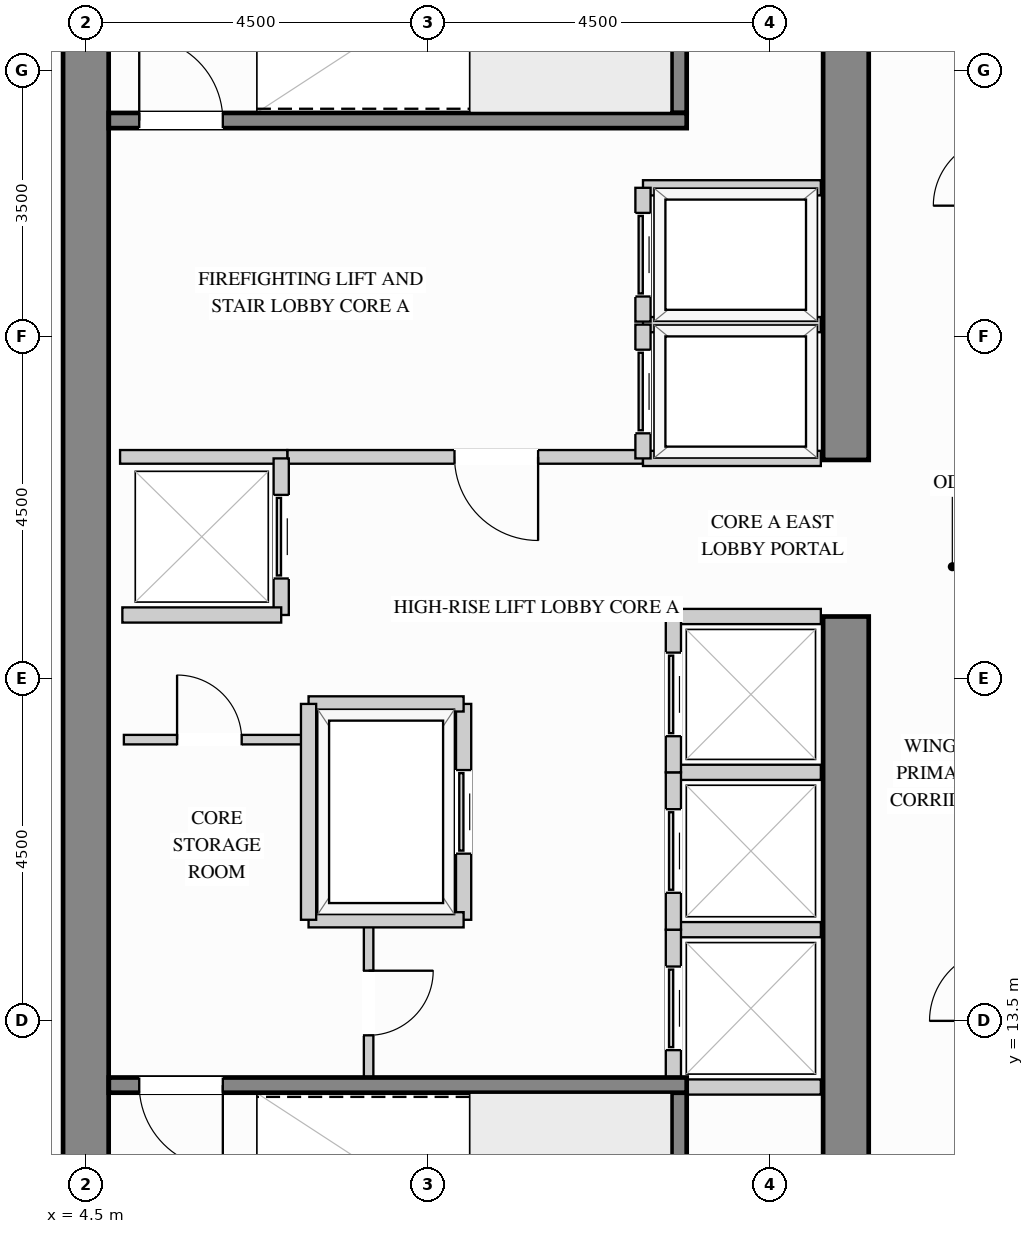
"""IFC4 building model, lengths in metres.
Left out: names, types, materials, properties, quantities, classifications, styles, units other than length and angle.
Written with IfcOpenShell. Run it as: python <this file> out.ifc"""

import sys

from ifc_helpers import new_model, si_unit, direction, frame, frame_2d, origin, place, context, subcontext, project, spatial, rectangle, extrude, source, transform, mapped, element, fill, save


model = new_model("IFC4")
c1 = context("Model", 3, precision=1e-05, world=origin(), true_north=direction((0.0, 1.0)))
c2 = subcontext(c1, "Body", "Model", "MODEL_VIEW")
j1 = project(units=[si_unit("LENGTHUNIT", "METRE"), si_unit("PLANEANGLEUNIT", "RADIAN")], contexts=[c1])
p1 = place(None, origin())
s1 = spatial("IfcSite", under=j1, at=p1, CompositionType="ELEMENT")
p2 = place(p1, origin())
s2 = spatial("IfcBuilding", under=s1, at=p2, CompositionType="ELEMENT")
p3 = place(p2, frame((0.0, 0.0, 204.3)))
s3 = spatial("IfcBuildingStorey", under=s2, at=p3, CompositionType="ELEMENT", Elevation=204.3)
m1 = source(origin(), c2, "Body", "SweptSolid", [
    extrude(rectangle(XDim=10.02, YDim=0.6, at=frame_2d((5.01, 0.0))), origin(), (0.0, 0.0, 1.0), 3.32),
])
p4 = place(p3, frame((14.5, 8.8, 0.0), z_axis=(0.0, 0.0, 1.0), x_axis=(0.0, 1.0, 0.0)))
e1 = element("IfcWall", 1, at=p4, inside=s3, PredefinedType="SHEAR", context=c2, shape_type="MappedRepresentation", body=[
    mapped(m1, transform((0.0, 0.0, 0.0), x_axis=(1.0, 0.0, 0.0), y_axis=(0.0, 1.0, 0.0), z_axis=(0.0, 0.0, 1.0))),
])
m2 = source(origin(), c2, "Body", "SweptSolid", [
    extrude(rectangle(XDim=8.32, YDim=0.6, at=frame_2d((4.16, 0.0))), origin(), (0.0, 0.0, 1.0), 3.32),
])
p5 = place(p3, frame((14.5, 20.88, 0.0), z_axis=(0.0, 0.0, 1.0), x_axis=(0.0, 1.0, 0.0)))
e2 = element("IfcWall", 2, at=p5, inside=s3, PredefinedType="SHEAR", context=c2, shape_type="MappedRepresentation", body=[
    mapped(m2, transform((0.0, 0.0, 0.0), x_axis=(1.0, 0.0, 0.0), y_axis=(0.0, 1.0, 0.0), z_axis=(0.0, 0.0, 1.0))),
])
m3 = source(origin(), c2, "Body", "SweptSolid", [
    extrude(rectangle(XDim=20.4, YDim=0.6, at=frame_2d((10.2, 0.0))), origin(), (0.0, 0.0, 1.0), 3.32),
])
p6 = place(p3, frame((4.5, 8.8, 0.0), z_axis=(0.0, 0.0, 1.0), x_axis=(0.0, 1.0, 0.0)))
e3 = element("IfcWall", 3, at=p6, inside=s3, PredefinedType="SHEAR", context=c2, shape_type="MappedRepresentation", body=[
    mapped(m3, transform((0.0, 0.0, 0.0), x_axis=(1.0, 0.0, 0.0), y_axis=(0.0, 1.0, 0.0), z_axis=(0.0, 0.0, 1.0))),
])
p7 = place(p3, frame((7.15, 20.92, 0.0), z_axis=(0.0, 0.0, 1.0), x_axis=(1.0, 0.0, 0.0)))
e4 = element("IfcWall", 4, at=p7, inside=s3, PredefinedType="PARTITIONING", context=c2, shape_type="SweptSolid", body=[
    extrude(rectangle(XDim=4.68, YDim=0.18, at=frame_2d((2.34, 0.0))), origin(), (0.0, 0.0, 1.0), 3.305),
])
p8 = place(p7, frame((2.2, 0.0, 0.0)))
e5 = element("IfcOpeningElement", 5, at=p8, cuts=e4, PredefinedType="OPENING", context=c2, shape_type="SweptSolid", body=[
    extrude(rectangle(XDim=1.1, YDim=2.15, at=frame_2d((0.55, 1.075))), frame((0.0, 0.1, 0.0), z_axis=(0.0, -1.0, 0.0), x_axis=(1.0, 0.0, 0.0)), (0.0, 0.0, 1.0), 0.2),
])
m4 = source(origin(), c2, "Body", "SweptSolid", [
    extrude(rectangle(XDim=2.2, YDim=0.18, at=frame_2d((1.1, 0.0))), origin(), (0.0, 0.0, 1.0), 3.305),
])
p9 = place(p3, frame((4.95, 20.92, 0.0), z_axis=(0.0, 0.0, 1.0), x_axis=(1.0, 0.0, 0.0)))
e6 = element("IfcWall", 6, at=p9, inside=s3, PredefinedType="PARTITIONING", context=c2, shape_type="MappedRepresentation", body=[
    mapped(m4, transform((0.0, 0.0, 0.0), x_axis=(1.0, 0.0, 0.0), y_axis=(0.0, 1.0, 0.0), z_axis=(0.0, 0.0, 1.0))),
])
p10 = place(p3, frame((8.22, 12.75, 0.0), z_axis=(0.0, 0.0, 1.0), x_axis=(0.0, 1.0, 0.0)))
e7 = element("IfcWall", 7, at=p10, inside=s3, PredefinedType="PARTITIONING", context=c2, shape_type="SweptSolid", body=[
    extrude(rectangle(XDim=2.07, YDim=0.125, at=frame_2d((1.035, 0.0))), origin(), (0.0, 0.0, 1.0), 3.305),
])
p11 = place(p10, frame((0.56, 0.0, 0.0)))
e8 = element("IfcOpeningElement", 8, at=p11, cuts=e7, PredefinedType="OPENING", context=c2, shape_type="SweptSolid", body=[
    extrude(rectangle(XDim=0.85, YDim=2.1, at=frame_2d((0.425, 1.05))), frame((0.0, 0.073, 0.0), z_axis=(0.0, -1.0, 0.0), x_axis=(1.0, 0.0, 0.0)), (0.0, 0.0, 1.0), 0.145),
])
p12 = place(p3, frame((5.0, 17.2, 0.0), z_axis=(0.0, 0.0, 1.0), x_axis=(1.0, 0.0, 0.0)))
e9 = element("IfcWall", 9, at=p12, inside=s3, PredefinedType="PARTITIONING", context=c2, shape_type="SweptSolid", body=[
    extrude(rectangle(XDim=2.4, YDim=0.125, at=frame_2d((1.2, 0.0))), origin(), (0.0, 0.0, 1.0), 3.305),
])
p13 = place(p12, frame((0.7, 0.0, 0.0)))
e10 = element("IfcOpeningElement", 10, at=p13, cuts=e9, PredefinedType="OPENING", context=c2, shape_type="SweptSolid", body=[
    extrude(rectangle(XDim=0.85, YDim=2.1, at=frame_2d((0.425, 1.05))), frame((0.0, 0.073, 0.0), z_axis=(0.0, -1.0, 0.0), x_axis=(1.0, 0.0, 0.0)), (0.0, 0.0, 1.0), 0.145),
])
m5 = source(origin(), c2, "Body", "SweptSolid", [
    extrude(rectangle(XDim=2.34, YDim=0.2, at=frame_2d((1.17, 0.0))), origin(), (0.0, 0.0, 1.0), 3.305),
])
for number, where, z_axis, x_axis in (
    (11, (11.83, 22.66, 0.0), (0.0, 0.0, 1.0), (1.0, 0.0, 0.0)),
    (12, (11.83, 20.9, 0.0), (0.0, 0.0, 1.0), (1.0, 0.0, 0.0)),
):
    element("IfcWall", number, at=place(p3, frame(where, z_axis=z_axis, x_axis=x_axis)), inside=s3, PredefinedType="PARTITIONING", context=c2, shape_type="MappedRepresentation", body=[
        mapped(m5, transform((0.0, 0.0, 0.0), x_axis=(1.0, 0.0, 0.0), y_axis=(0.0, 1.0, 0.0), z_axis=(0.0, 0.0, 1.0))),
    ])
p14 = place(p3, frame((11.83, 20.9, 0.0), z_axis=(0.0, 0.0, 1.0), x_axis=(0.0, 1.0, 0.0)))
e13 = element("IfcWall", 13, at=p14, inside=s3, PredefinedType="PARTITIONING", context=c2, shape_type="SweptSolid", body=[
    extrude(rectangle(XDim=1.76, YDim=0.2, at=frame_2d((0.88, 0.0))), origin(), (0.0, 0.0, 1.0), 3.305),
])
p15 = place(p14, frame((0.33, 0.0, 0.0)))
e14 = element("IfcOpeningElement", 14, at=p15, cuts=e13, PredefinedType="OPENING", context=c2, shape_type="SweptSolid", body=[
    extrude(rectangle(XDim=1.1, YDim=2.2, at=frame_2d((0.55, 1.1))), frame((0.0, 0.11, 0.0), z_axis=(0.0, -1.0, 0.0), x_axis=(1.0, 0.0, 0.0)), (0.0, 0.0, 1.0), 0.22),
])
p16 = place(p3, frame((11.83, 24.46, 0.0), z_axis=(0.0, 0.0, 1.0), x_axis=(1.0, 0.0, 0.0)))
e15 = element("IfcWall", 15, at=p16, inside=s3, PredefinedType="PARTITIONING", context=c2, shape_type="MappedRepresentation", body=[
    mapped(m5, transform((0.0, 0.0, 0.0), x_axis=(1.0, 0.0, 0.0), y_axis=(0.0, 1.0, 0.0), z_axis=(0.0, 0.0, 1.0))),
])
p17 = place(p3, frame((11.83, 22.7, 0.0), z_axis=(0.0, 0.0, 1.0), x_axis=(0.0, 1.0, 0.0)))
e16 = element("IfcWall", 16, at=p17, inside=s3, PredefinedType="PARTITIONING", context=c2, shape_type="SweptSolid", body=[
    extrude(rectangle(XDim=1.76, YDim=0.2, at=frame_2d((0.88, 0.0))), origin(), (0.0, 0.0, 1.0), 3.305),
])
p18 = place(p17, frame((0.33, 0.0, 0.0)))
e17 = element("IfcOpeningElement", 17, at=p18, cuts=e16, PredefinedType="OPENING", context=c2, shape_type="SweptSolid", body=[
    extrude(rectangle(XDim=1.1, YDim=2.2, at=frame_2d((0.55, 1.1))), frame((0.0, 0.11, 0.0), z_axis=(0.0, -1.0, 0.0), x_axis=(1.0, 0.0, 0.0)), (0.0, 0.0, 1.0), 0.22),
])
m6 = source(origin(), c2, "Body", "SweptSolid", [
    extrude(rectangle(XDim=1.94, YDim=0.2, at=frame_2d((0.97, 0.0))), origin(), (0.0, 0.0, 1.0), 3.305),
])
for number, where, z_axis, x_axis in (
    (18, (12.23, 14.7, 0.0), (0.0, 0.0, 1.0), (1.0, 0.0, 0.0)),
    (19, (12.23, 12.63, 0.0), (0.0, 0.0, 1.0), (1.0, 0.0, 0.0)),
):
    element("IfcWall", number, at=place(p3, frame(where, z_axis=z_axis, x_axis=x_axis)), inside=s3, PredefinedType="PARTITIONING", context=c2, shape_type="MappedRepresentation", body=[
        mapped(m6, transform((0.0, 0.0, 0.0), x_axis=(1.0, 0.0, 0.0), y_axis=(0.0, 1.0, 0.0), z_axis=(0.0, 0.0, 1.0))),
    ])
p19 = place(p3, frame((12.23, 12.63, 0.0), z_axis=(0.0, 0.0, 1.0), x_axis=(0.0, 1.0, 0.0)))
e20 = element("IfcWall", 20, at=p19, inside=s3, PredefinedType="PARTITIONING", context=c2, shape_type="SweptSolid", body=[
    extrude(rectangle(XDim=2.07, YDim=0.2, at=frame_2d((1.035, 0.0))), origin(), (0.0, 0.0, 1.0), 3.305),
])
p20 = place(p19, frame((0.485, 0.0, 0.0)))
e21 = element("IfcOpeningElement", 21, at=p20, cuts=e20, PredefinedType="OPENING", context=c2, shape_type="SweptSolid", body=[
    extrude(rectangle(XDim=1.1, YDim=2.2, at=frame_2d((0.55, 1.1))), frame((0.0, 0.11, 0.0), z_axis=(0.0, -1.0, 0.0), x_axis=(1.0, 0.0, 0.0)), (0.0, 0.0, 1.0), 0.22),
])
p21 = place(p3, frame((12.23, 16.77, 0.0), z_axis=(0.0, 0.0, 1.0), x_axis=(1.0, 0.0, 0.0)))
e22 = element("IfcWall", 22, at=p21, inside=s3, PredefinedType="PARTITIONING", context=c2, shape_type="MappedRepresentation", body=[
    mapped(m6, transform((0.0, 0.0, 0.0), x_axis=(1.0, 0.0, 0.0), y_axis=(0.0, 1.0, 0.0), z_axis=(0.0, 0.0, 1.0))),
])
p22 = place(p3, frame((12.23, 14.7, 0.0), z_axis=(0.0, 0.0, 1.0), x_axis=(0.0, 1.0, 0.0)))
e23 = element("IfcWall", 23, at=p22, inside=s3, PredefinedType="PARTITIONING", context=c2, shape_type="SweptSolid", body=[
    extrude(rectangle(XDim=2.07, YDim=0.2, at=frame_2d((1.035, 0.0))), origin(), (0.0, 0.0, 1.0), 3.305),
])
p23 = place(p22, frame((0.485, 0.0, 0.0)))
e24 = element("IfcOpeningElement", 24, at=p23, cuts=e23, PredefinedType="OPENING", context=c2, shape_type="SweptSolid", body=[
    extrude(rectangle(XDim=1.1, YDim=2.2, at=frame_2d((0.55, 1.1))), frame((0.0, 0.11, 0.0), z_axis=(0.0, -1.0, 0.0), x_axis=(1.0, 0.0, 0.0)), (0.0, 0.0, 1.0), 0.22),
])
p24 = place(p3, frame((12.23, 18.82, 0.0), z_axis=(0.0, 0.0, 1.0), x_axis=(1.0, 0.0, 0.0)))
e25 = element("IfcWall", 25, at=p24, inside=s3, PredefinedType="PARTITIONING", context=c2, shape_type="MappedRepresentation", body=[
    mapped(m6, transform((0.0, 0.0, 0.0), x_axis=(1.0, 0.0, 0.0), y_axis=(0.0, 1.0, 0.0), z_axis=(0.0, 0.0, 1.0))),
])
p25 = place(p3, frame((12.23, 16.77, 0.0), z_axis=(0.0, 0.0, 1.0), x_axis=(0.0, 1.0, 0.0)))
e26 = element("IfcWall", 26, at=p25, inside=s3, PredefinedType="PARTITIONING", context=c2, shape_type="SweptSolid", body=[
    extrude(rectangle(XDim=2.05, YDim=0.2, at=frame_2d((1.025, 0.0))), origin(), (0.0, 0.0, 1.0), 3.305),
])
p26 = place(p25, frame((0.475, 0.0, 0.0)))
e27 = element("IfcOpeningElement", 27, at=p26, cuts=e26, PredefinedType="OPENING", context=c2, shape_type="SweptSolid", body=[
    extrude(rectangle(XDim=1.1, YDim=2.2, at=frame_2d((0.55, 1.1))), frame((0.0, 0.11, 0.0), z_axis=(0.0, -1.0, 0.0), x_axis=(1.0, 0.0, 0.0)), (0.0, 0.0, 1.0), 0.22),
])
p27 = place(p3, frame((7.07, 18.84, 0.0), z_axis=(0.0, 0.0, 1.0), x_axis=(0.0, 1.0, 0.0)))
e28 = element("IfcWall", 28, at=p27, inside=s3, PredefinedType="PARTITIONING", context=c2, shape_type="SweptSolid", body=[
    extrude(rectangle(XDim=2.06, YDim=0.2, at=frame_2d((1.03, 0.0))), origin(), (0.0, 0.0, 1.0), 3.305),
])
p28 = place(p27, frame((0.48, 0.0, 0.0)))
e29 = element("IfcOpeningElement", 29, at=p28, cuts=e28, PredefinedType="OPENING", context=c2, shape_type="SweptSolid", body=[
    extrude(rectangle(XDim=1.1, YDim=2.2, at=frame_2d((0.55, 1.1))), frame((0.0, 0.11, 0.0), z_axis=(0.0, -1.0, 0.0), x_axis=(1.0, 0.0, 0.0)), (0.0, 0.0, 1.0), 0.22),
])
m7 = source(origin(), c2, "Body", "SweptSolid", [
    extrude(rectangle(XDim=2.09, YDim=0.2, at=frame_2d((1.045, 0.0))), origin(), (0.0, 0.0, 1.0), 3.305),
])
p29 = place(p3, frame((4.98, 18.84, 0.0), z_axis=(0.0, 0.0, 1.0), x_axis=(1.0, 0.0, 0.0)))
e30 = element("IfcWall", 30, at=p29, inside=s3, PredefinedType="PARTITIONING", context=c2, shape_type="MappedRepresentation", body=[
    mapped(m7, transform((0.0, 0.0, 0.0), x_axis=(1.0, 0.0, 0.0), y_axis=(0.0, 1.0, 0.0), z_axis=(0.0, 0.0, 1.0))),
])
p30 = place(p3, frame((9.47, 14.83, 0.0), z_axis=(0.0, 0.0, 1.0), x_axis=(0.0, 1.0, 0.0)))
e31 = element("IfcWall", 31, at=p30, inside=s3, PredefinedType="PARTITIONING", context=c2, shape_type="SweptSolid", body=[
    extrude(rectangle(XDim=2.84, YDim=0.2, at=frame_2d((1.42, 0.0))), origin(), (0.0, 0.0, 1.0), 3.305),
])
p31 = place(p30, frame((0.87, 0.0, 0.0)))
e32 = element("IfcOpeningElement", 32, at=p31, cuts=e31, PredefinedType="OPENING", context=c2, shape_type="SweptSolid", body=[
    extrude(rectangle(XDim=1.1, YDim=2.2, at=frame_2d((0.55, 1.1))), frame((0.0, 0.11, 0.0), z_axis=(0.0, -1.0, 0.0), x_axis=(1.0, 0.0, 0.0)), (0.0, 0.0, 1.0), 0.22),
])
m8 = source(origin(), c2, "Body", "SweptSolid", [
    extrude(rectangle(XDim=2.04, YDim=0.2, at=frame_2d((1.02, 0.0))), origin(), (0.0, 0.0, 1.0), 3.305),
])
for number, where, z_axis, x_axis in (
    (33, (7.43, 17.67, 0.0), (0.0, 0.0, 1.0), (1.0, 0.0, 0.0)),
    (34, (7.43, 14.83, 0.0), (0.0, 0.0, 1.0), (1.0, 0.0, 0.0)),
):
    element("IfcWall", number, at=place(p3, frame(where, z_axis=z_axis, x_axis=x_axis)), inside=s3, PredefinedType="PARTITIONING", context=c2, shape_type="MappedRepresentation", body=[
        mapped(m8, transform((0.0, 0.0, 0.0), x_axis=(1.0, 0.0, 0.0), y_axis=(0.0, 1.0, 0.0), z_axis=(0.0, 0.0, 1.0))),
    ])
m9 = source(origin(), c2, "Body", "SweptSolid", [
    extrude(rectangle(XDim=2.84, YDim=0.2, at=frame_2d((1.42, 0.0))), origin(), (0.0, 0.0, 1.0), 3.305),
])
p32 = place(p3, frame((7.43, 14.83, 0.0), z_axis=(0.0, 0.0, 1.0), x_axis=(0.0, 1.0, 0.0)))
e35 = element("IfcWall", 35, at=p32, inside=s3, PredefinedType="PARTITIONING", context=c2, shape_type="MappedRepresentation", body=[
    mapped(m9, transform((0.0, 0.0, 0.0), x_axis=(1.0, 0.0, 0.0), y_axis=(0.0, 1.0, 0.0), z_axis=(0.0, 0.0, 1.0))),
])
m10 = source(origin(), c2, "Body", "SweptSolid", [
    extrude(rectangle(XDim=3.753, YDim=0.2, at=frame_2d((1.876, 0.0))), origin(), (0.0, 0.0, 1.0), 3.32),
])
p33 = place(p3, frame((12.305, 8.802, 0.0), z_axis=(0.0, 0.0, 1.0), x_axis=(0.0, 1.0, 0.0)))
e36 = element("IfcWall", 36, at=p33, inside=s3, PredefinedType="SHEAR", context=c2, shape_type="MappedRepresentation", body=[
    mapped(m10, transform((0.0, 0.0, 0.0), x_axis=(1.0, 0.0, 0.0), y_axis=(0.0, 1.0, 0.0), z_axis=(0.0, 0.0, 1.0))),
])
p34 = place(p3, frame((4.802, 12.655, 0.0), z_axis=(0.0, 0.0, 1.0), x_axis=(1.0, 0.0, 0.0)))
e37 = element("IfcWall", 37, at=p34, inside=s3, PredefinedType="SHEAR", context=c2, shape_type="SweptSolid", body=[
    extrude(rectangle(XDim=7.603, YDim=0.2, at=frame_2d((3.802, 0.0))), origin(), (0.0, 0.0, 1.0), 3.32),
])
p35 = place(p34, frame((0.4, 0.0, 0.0)))
e38 = element("IfcOpeningElement", 38, at=p35, cuts=e37, PredefinedType="OPENING", context=c2, shape_type="SweptSolid", body=[
    extrude(rectangle(XDim=1.1, YDim=2.15, at=frame_2d((0.55, 1.075))), frame((0.0, 0.11, 0.0), z_axis=(0.0, -1.0, 0.0), x_axis=(1.0, 0.0, 0.0)), (0.0, 0.0, 1.0), 0.22),
])
p36 = place(p3, frame((12.305, 25.445, 0.0), z_axis=(0.0, 0.0, 1.0), x_axis=(0.0, 1.0, 0.0)))
e39 = element("IfcWall", 39, at=p36, inside=s3, PredefinedType="SHEAR", context=c2, shape_type="MappedRepresentation", body=[
    mapped(m10, transform((0.0, 0.0, 0.0), x_axis=(1.0, 0.0, 0.0), y_axis=(0.0, 1.0, 0.0), z_axis=(0.0, 0.0, 1.0))),
])
p37 = place(p3, frame((4.802, 25.345, 0.0), z_axis=(0.0, 0.0, 1.0), x_axis=(1.0, 0.0, 0.0)))
e40 = element("IfcWall", 40, at=p37, inside=s3, PredefinedType="SHEAR", context=c2, shape_type="SweptSolid", body=[
    extrude(rectangle(XDim=7.603, YDim=0.2, at=frame_2d((3.802, 0.0))), origin(), (0.0, 0.0, 1.0), 3.32),
])
p38 = place(p37, frame((0.4, 0.0, 0.0)))
e41 = element("IfcOpeningElement", 41, at=p38, cuts=e40, PredefinedType="OPENING", context=c2, shape_type="SweptSolid", body=[
    extrude(rectangle(XDim=1.1, YDim=2.15, at=frame_2d((0.55, 1.075))), frame((0.0, 0.11, 0.0), z_axis=(0.0, -1.0, 0.0), x_axis=(1.0, 0.0, 0.0)), (0.0, 0.0, 1.0), 0.22),
])
m11 = source(origin(), c2, "Body", "SweptSolid", [
    extrude(rectangle(XDim=1.1, YDim=2.15, at=frame_2d((0.55, 1.075))), frame((0.0, 0.025, 0.0), z_axis=(0.0, -1.0, 0.0), x_axis=(1.0, 0.0, 0.0)), (0.0, 0.0, 1.0), 0.05),
])
p39 = place(p8, origin())
e42 = element("IfcDoor", 42, at=p39, inside=s3, OperationType="SINGLE_SWING_RIGHT", PredefinedType="DOOR", context=c2, shape_type="MappedRepresentation", body=[
    mapped(m11, transform((0.0, 0.0, 0.0), x_axis=(1.0, 0.0, 0.0), y_axis=(0.0, 1.0, 0.0), z_axis=(0.0, 0.0, 1.0))),
])
fill(e5, e42)
m12 = source(origin(), c2, "Body", "SweptSolid", [
    extrude(rectangle(XDim=1.1, YDim=2.2, at=frame_2d((0.55, 1.1))), frame((0.0, 0.025, 0.0), z_axis=(0.0, -1.0, 0.0), x_axis=(1.0, 0.0, 0.0)), (0.0, 0.0, 1.0), 0.05),
])
p40 = place(p15, origin())
e43 = element("IfcDoor", 43, at=p40, inside=s3, OperationType="SLIDING_TO_LEFT", PredefinedType="DOOR", context=c2, shape_type="MappedRepresentation", body=[
    mapped(m12, transform((0.0, 0.0, 0.0), x_axis=(1.0, 0.0, 0.0), y_axis=(0.0, 1.0, 0.0), z_axis=(0.0, 0.0, 1.0))),
])
fill(e14, e43)
p41 = place(p18, origin())
e44 = element("IfcDoor", 44, at=p41, inside=s3, OperationType="SLIDING_TO_LEFT", PredefinedType="DOOR", context=c2, shape_type="MappedRepresentation", body=[
    mapped(m12, transform((0.0, 0.0, 0.0), x_axis=(1.0, 0.0, 0.0), y_axis=(0.0, 1.0, 0.0), z_axis=(0.0, 0.0, 1.0))),
])
fill(e17, e44)
p42 = place(p20, origin())
e45 = element("IfcDoor", 45, at=p42, inside=s3, OperationType="SLIDING_TO_LEFT", PredefinedType="DOOR", context=c2, shape_type="MappedRepresentation", body=[
    mapped(m12, transform((0.0, 0.0, 0.0), x_axis=(1.0, 0.0, 0.0), y_axis=(0.0, 1.0, 0.0), z_axis=(0.0, 0.0, 1.0))),
])
fill(e21, e45)
p43 = place(p23, origin())
e46 = element("IfcDoor", 46, at=p43, inside=s3, OperationType="SLIDING_TO_LEFT", PredefinedType="DOOR", context=c2, shape_type="MappedRepresentation", body=[
    mapped(m12, transform((0.0, 0.0, 0.0), x_axis=(1.0, 0.0, 0.0), y_axis=(0.0, 1.0, 0.0), z_axis=(0.0, 0.0, 1.0))),
])
fill(e24, e46)
p44 = place(p26, origin())
e47 = element("IfcDoor", 47, at=p44, inside=s3, OperationType="SLIDING_TO_LEFT", PredefinedType="DOOR", context=c2, shape_type="MappedRepresentation", body=[
    mapped(m12, transform((0.0, 0.0, 0.0), x_axis=(1.0, 0.0, 0.0), y_axis=(0.0, 1.0, 0.0), z_axis=(0.0, 0.0, 1.0))),
])
fill(e27, e47)
p45 = place(p28, origin())
e48 = element("IfcDoor", 48, at=p45, inside=s3, OperationType="SLIDING_TO_LEFT", PredefinedType="DOOR", context=c2, shape_type="MappedRepresentation", body=[
    mapped(m12, transform((0.0, 0.0, 0.0), x_axis=(1.0, 0.0, 0.0), y_axis=(0.0, 1.0, 0.0), z_axis=(0.0, 0.0, 1.0))),
])
fill(e29, e48)
p46 = place(p31, origin())
e49 = element("IfcDoor", 49, at=p46, inside=s3, OperationType="SLIDING_TO_LEFT", PredefinedType="DOOR", context=c2, shape_type="MappedRepresentation", body=[
    mapped(m12, transform((0.0, 0.0, 0.0), x_axis=(1.0, 0.0, 0.0), y_axis=(0.0, 1.0, 0.0), z_axis=(0.0, 0.0, 1.0))),
])
fill(e32, e49)
m13 = source(origin(), c2, "Body", "SweptSolid", [
    extrude(rectangle(XDim=0.85, YDim=2.1, at=frame_2d((0.425, 1.05))), frame((0.0, 0.025, 0.0), z_axis=(0.0, -1.0, 0.0), x_axis=(1.0, 0.0, 0.0)), (0.0, 0.0, 1.0), 0.05),
])
p47 = place(p13, origin())
e50 = element("IfcDoor", 50, at=p47, inside=s3, OperationType="SINGLE_SWING_LEFT", PredefinedType="DOOR", context=c2, shape_type="MappedRepresentation", body=[
    mapped(m13, transform((0.0, 0.0, 0.0), x_axis=(1.0, 0.0, 0.0), y_axis=(0.0, 1.0, 0.0), z_axis=(0.0, 0.0, 1.0))),
])
fill(e10, e50)
p48 = place(p11, origin())
e51 = element("IfcDoor", 51, at=p48, inside=s3, OperationType="SINGLE_SWING_RIGHT", PredefinedType="DOOR", context=c2, shape_type="MappedRepresentation", body=[
    mapped(m13, transform((0.0, 0.0, 0.0), x_axis=(1.0, 0.0, 0.0), y_axis=(0.0, 1.0, 0.0), z_axis=(0.0, 0.0, 1.0))),
])
fill(e8, e51)
m14 = source(origin(), c2, "Body", "SweptSolid", [
    extrude(rectangle(XDim=1.1, YDim=2.15, at=frame_2d((0.55, 1.075))), frame((0.0, 0.025, 0.0), z_axis=(0.0, -1.0, 0.0), x_axis=(1.0, 0.0, 0.0)), (0.0, 0.0, 1.0), 0.05),
])
p49 = place(p35, origin())
e52 = element("IfcDoor", 52, at=p49, inside=s3, OperationType="SINGLE_SWING_RIGHT", PredefinedType="DOOR", context=c2, shape_type="MappedRepresentation", body=[
    mapped(m14, transform((0.0, 0.0, 0.0), x_axis=(1.0, 0.0, 0.0), y_axis=(0.0, 1.0, 0.0), z_axis=(0.0, 0.0, 1.0))),
])
fill(e38, e52)
p50 = place(p38, origin())
e53 = element("IfcDoor", 53, at=p50, inside=s3, OperationType="SINGLE_SWING_LEFT", PredefinedType="DOOR", context=c2, shape_type="MappedRepresentation", body=[
    mapped(m14, transform((0.0, 0.0, 0.0), x_axis=(1.0, 0.0, 0.0), y_axis=(0.0, 1.0, 0.0), z_axis=(0.0, 0.0, 1.0))),
])
fill(e41, e53)
save(model, sys.argv[1])
